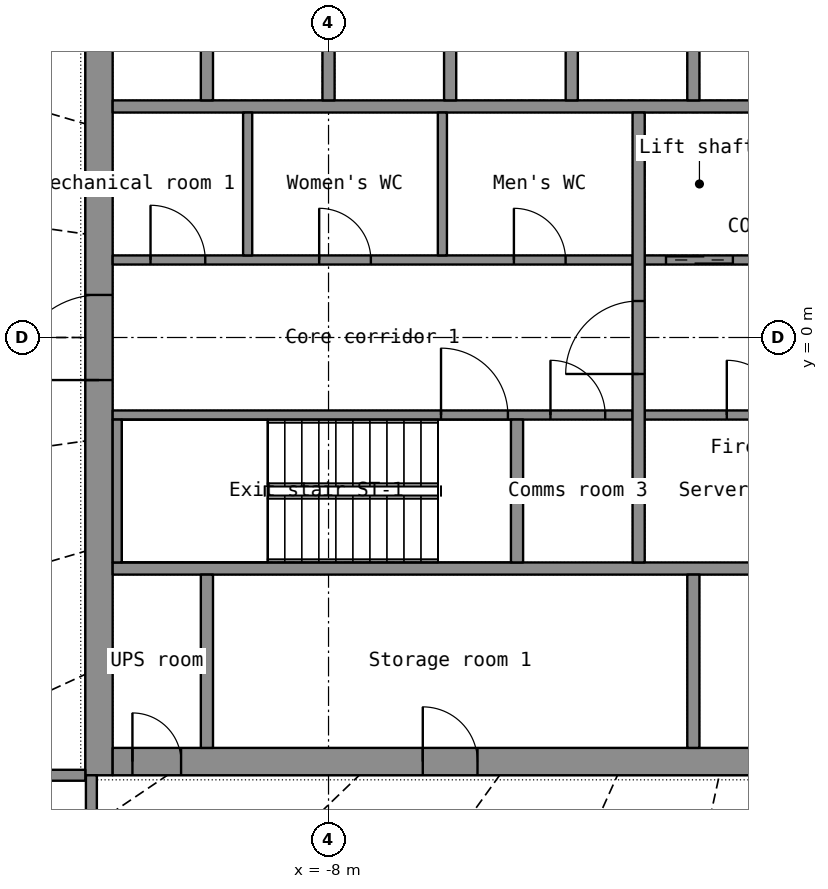
"""IFC4 building model, lengths in metres.
Left out: names, types, materials, properties, quantities, classifications, styles, units other than length and angle.
Written with IfcOpenShell. Run it as: python <this file> out.ifc"""

import sys

from ifc_helpers import new_model, si_unit, direction, frame, frame_2d, origin, place, context, subcontext, project, spatial, rectangle, extrude, element, fill, save


model = new_model("IFC4")
c1 = context("Model", 3, precision=1e-05, world=origin(), true_north=direction((0.0, 1.0)))
c2 = subcontext(c1, "Body", "Model", "MODEL_VIEW")
j1 = project(units=[si_unit("LENGTHUNIT", "METRE"), si_unit("PLANEANGLEUNIT", "RADIAN")], contexts=[c1])
p1 = place(None, origin())
s1 = spatial("IfcSite", under=j1, at=p1, CompositionType="ELEMENT")
p2 = place(p1, origin())
s2 = spatial("IfcBuilding", under=s1, at=p2, CompositionType="ELEMENT")
p3 = place(p2, frame((0.0, 0.0, 205.2)))
s3 = spatial("IfcBuildingStorey", under=s2, at=p3, CompositionType="ELEMENT", Elevation=205.2)
p4 = place(p3, frame((-11.775, -7.2, 0.0), z_axis=(0.0, 0.0, 1.0), x_axis=(0.0, 1.0, 0.0)))
e1 = element("IfcWall", 1, at=p4, inside=s3, PredefinedType="SHEAR", context=c2, shape_type="SweptSolid", body=[
    extrude(rectangle(XDim=14.4, YDim=0.45, at=frame_2d((7.2, 0.0))), origin(), (0.0, 0.0, 1.0), 7.0),
])
p5 = place(p4, frame((6.5, 0.0, 0.0)))
e2 = element("IfcOpeningElement", 2, at=p5, cuts=e1, PredefinedType="OPENING", context=c2, shape_type="SweptSolid", body=[
    extrude(rectangle(XDim=1.4, YDim=2.2, at=frame_2d((0.7, 1.1))), frame((0.0, 0.235, 0.0), z_axis=(0.0, -1.0, 0.0), x_axis=(1.0, 0.0, 0.0)), (0.0, 0.0, 1.0), 0.47),
])
p6 = place(p3, frame((-11.55, -6.975, 0.0), z_axis=(0.0, 0.0, 1.0), x_axis=(1.0, 0.0, 0.0)))
e3 = element("IfcWall", 3, at=p6, inside=s3, PredefinedType="SHEAR", context=c2, shape_type="SweptSolid", body=[
    extrude(rectangle(XDim=23.1, YDim=0.45, at=frame_2d((11.55, 0.0))), origin(), (0.0, 0.0, 1.0), 7.0),
])
p7 = place(p6, frame((20.0, 0.0, 0.0)))
e4 = element("IfcOpeningElement", 4, at=p7, cuts=e3, PredefinedType="OPENING", context=c2, shape_type="SweptSolid", body=[
    extrude(rectangle(XDim=1.1, YDim=2.2, at=frame_2d((0.55, 1.1))), frame((0.0, 0.235, 0.0), z_axis=(0.0, -1.0, 0.0), x_axis=(1.0, 0.0, 0.0)), (0.0, 0.0, 1.0), 0.47),
])
p8 = place(p6, frame((5.1, 0.0, 0.0)))
e5 = element("IfcOpeningElement", 5, at=p8, cuts=e3, PredefinedType="OPENING", context=c2, shape_type="SweptSolid", body=[
    extrude(rectangle(XDim=0.9, YDim=2.1, at=frame_2d((0.45, 1.05))), frame((0.0, 0.235, 0.0), z_axis=(0.0, -1.0, 0.0), x_axis=(1.0, 0.0, 0.0)), (0.0, 0.0, 1.0), 0.47),
])
p9 = place(p6, frame((12.1, 0.0, 0.0)))
e6 = element("IfcOpeningElement", 6, at=p9, cuts=e3, PredefinedType="OPENING", context=c2, shape_type="SweptSolid", body=[
    extrude(rectangle(XDim=0.9, YDim=2.1, at=frame_2d((0.45, 1.05))), frame((0.0, 0.235, 0.0), z_axis=(0.0, -1.0, 0.0), x_axis=(1.0, 0.0, 0.0)), (0.0, 0.0, 1.0), 0.47),
])
p10 = place(p6, frame((17.1, 0.0, 0.0)))
e7 = element("IfcOpeningElement", 7, at=p10, cuts=e3, PredefinedType="OPENING", context=c2, shape_type="SweptSolid", body=[
    extrude(rectangle(XDim=0.9, YDim=2.1, at=frame_2d((0.45, 1.05))), frame((0.0, 0.235, 0.0), z_axis=(0.0, -1.0, 0.0), x_axis=(1.0, 0.0, 0.0)), (0.0, 0.0, 1.0), 0.47),
])
p11 = place(p6, frame((0.325, 0.0, 0.0)))
e8 = element("IfcOpeningElement", 8, at=p11, cuts=e3, PredefinedType="OPENING", context=c2, shape_type="SweptSolid", body=[
    extrude(rectangle(XDim=0.8, YDim=2.05, at=frame_2d((0.4, 1.025))), frame((0.0, 0.235, 0.0), z_axis=(0.0, -1.0, 0.0), x_axis=(1.0, 0.0, 0.0)), (0.0, 0.0, 1.0), 0.47),
])
p12 = place(p6, frame((21.975, 0.0, 0.0)))
e9 = element("IfcOpeningElement", 9, at=p12, cuts=e3, PredefinedType="OPENING", context=c2, shape_type="SweptSolid", body=[
    extrude(rectangle(XDim=0.8, YDim=2.05, at=frame_2d((0.4, 1.025))), frame((0.0, 0.235, 0.0), z_axis=(0.0, -1.0, 0.0), x_axis=(1.0, 0.0, 0.0)), (0.0, 0.0, 1.0), 0.47),
])
for number, where, z_axis, x_axis in (
    (10, (-11.55, -3.8, 0.0), (0.0, 0.0, 1.0), (1.0, 0.0, 0.0)),
    (11, (-11.55, 3.8, 0.0), (0.0, 0.0, 1.0), (1.0, 0.0, 0.0)),
):
    element("IfcWall", number, at=place(p3, frame(where, z_axis=z_axis, x_axis=x_axis)), inside=s3, PredefinedType="SHEAR", context=c2, shape_type="SweptSolid", body=[
        extrude(rectangle(XDim=23.1, YDim=0.2, at=frame_2d((11.55, 0.0))), origin(), (0.0, 0.0, 1.0), 7.0),
    ])
p13 = place(p3, frame((-10.0, -6.75, 0.0), z_axis=(0.0, 0.0, 1.0), x_axis=(0.0, 1.0, 0.0)))
e12 = element("IfcWall", 12, at=p13, inside=s3, PredefinedType="SHEAR", context=c2, shape_type="SweptSolid", body=[
    extrude(rectangle(XDim=2.85, YDim=0.2, at=frame_2d((1.425, 0.0))), origin(), (0.0, 0.0, 1.0), 7.0),
])
p14 = place(p3, frame((-2.0, -6.75, 0.0), z_axis=(0.0, 0.0, 1.0), x_axis=(0.0, 1.0, 0.0)))
e13 = element("IfcWall", 13, at=p14, inside=s3, PredefinedType="PARTITIONING", context=c2, shape_type="SweptSolid", body=[
    extrude(rectangle(XDim=2.85, YDim=0.2, at=frame_2d((1.425, 0.0))), origin(), (0.0, 0.0, 1.0), 7.0),
])
for number, where, z_axis, x_axis in (
    (14, (-10.0, 3.9, 0.0), (0.0, 0.0, 1.0), (0.0, 1.0, 0.0)),
    (15, (-8.0, 3.9, 0.0), (0.0, 0.0, 1.0), (0.0, 1.0, 0.0)),
    (16, (-6.0, 3.9, 0.0), (0.0, 0.0, 1.0), (0.0, 1.0, 0.0)),
    (17, (-4.0, 3.9, 0.0), (0.0, 0.0, 1.0), (0.0, 1.0, 0.0)),
    (18, (-2.0, 3.9, 0.0), (0.0, 0.0, 1.0), (0.0, 1.0, 0.0)),
):
    element("IfcWall", number, at=place(p3, frame(where, z_axis=z_axis, x_axis=x_axis)), inside=s3, PredefinedType="SHEAR", context=c2, shape_type="SweptSolid", body=[
        extrude(rectangle(XDim=2.85, YDim=0.2, at=frame_2d((1.425, 0.0))), origin(), (0.0, 0.0, 1.0), 7.0),
    ])
p15 = place(p3, frame((-11.55, -1.275, 0.0), z_axis=(0.0, 0.0, 1.0), x_axis=(1.0, 0.0, 0.0)))
e19 = element("IfcWall", 19, at=p15, inside=s3, PredefinedType="SHEAR", context=c2, shape_type="SweptSolid", body=[
    extrude(rectangle(XDim=8.55, YDim=0.15, at=frame_2d((4.275, 0.0))), origin(), (0.0, 0.0, 1.0), 7.0),
])
p16 = place(p15, frame((5.4, 0.0, 0.0)))
e20 = element("IfcOpeningElement", 20, at=p16, cuts=e19, PredefinedType="OPENING", context=c2, shape_type="SweptSolid", body=[
    extrude(rectangle(XDim=1.1, YDim=2.15, at=frame_2d((0.55, 1.075))), frame((0.0, 0.085, 0.0), z_axis=(0.0, -1.0, 0.0), x_axis=(1.0, 0.0, 0.0)), (0.0, 0.0, 1.0), 0.17),
])
p17 = place(p15, frame((7.2, 0.0, 0.0)))
e21 = element("IfcOpeningElement", 21, at=p17, cuts=e19, PredefinedType="OPENING", context=c2, shape_type="SweptSolid", body=[
    extrude(rectangle(XDim=0.9, YDim=2.1, at=frame_2d((0.45, 1.05))), frame((0.0, 0.085, 0.0), z_axis=(0.0, -1.0, 0.0), x_axis=(1.0, 0.0, 0.0)), (0.0, 0.0, 1.0), 0.17),
])
p18 = place(p3, frame((-2.8, -1.275, 0.0), z_axis=(0.0, 0.0, 1.0), x_axis=(1.0, 0.0, 0.0)))
e22 = element("IfcWall", 22, at=p18, inside=s3, PredefinedType="SHEAR", context=c2, shape_type="SweptSolid", body=[
    extrude(rectangle(XDim=5.6, YDim=0.15, at=frame_2d((2.8, 0.0))), origin(), (0.0, 0.0, 1.0), 7.0),
])
p19 = place(p18, frame((4.15, 0.0, 0.0)))
e23 = element("IfcOpeningElement", 23, at=p19, cuts=e22, PredefinedType="OPENING", context=c2, shape_type="SweptSolid", body=[
    extrude(rectangle(XDim=1.1, YDim=2.2, at=frame_2d((0.55, 1.1))), frame((0.0, 0.085, 0.0), z_axis=(0.0, -1.0, 0.0), x_axis=(1.0, 0.0, 0.0)), (0.0, 0.0, 1.0), 0.17),
])
p20 = place(p18, frame((1.35, 0.0, 0.0)))
e24 = element("IfcOpeningElement", 24, at=p20, cuts=e22, PredefinedType="OPENING", context=c2, shape_type="SweptSolid", body=[
    extrude(rectangle(XDim=0.9, YDim=2.1, at=frame_2d((0.45, 1.05))), frame((0.0, 0.085, 0.0), z_axis=(0.0, -1.0, 0.0), x_axis=(1.0, 0.0, 0.0)), (0.0, 0.0, 1.0), 0.17),
])
p21 = place(p3, frame((-11.55, 1.275, 0.0), z_axis=(0.0, 0.0, 1.0), x_axis=(1.0, 0.0, 0.0)))
e25 = element("IfcWall", 25, at=p21, inside=s3, PredefinedType="PARTITIONING", context=c2, shape_type="SweptSolid", body=[
    extrude(rectangle(XDim=8.55, YDim=0.15, at=frame_2d((4.275, 0.0))), origin(), (0.0, 0.0, 1.0), 7.0),
])
p22 = place(p21, frame((0.623, 0.0, 0.0)))
e26 = element("IfcOpeningElement", 26, at=p22, cuts=e25, PredefinedType="OPENING", context=c2, shape_type="SweptSolid", body=[
    extrude(rectangle(XDim=0.9, YDim=2.1, at=frame_2d((0.45, 1.05))), frame((0.0, 0.085, 0.0), z_axis=(0.0, -1.0, 0.0), x_axis=(1.0, 0.0, 0.0)), (0.0, 0.0, 1.0), 0.17),
])
p23 = place(p21, frame((3.396, 0.0, 0.0)))
e27 = element("IfcOpeningElement", 27, at=p23, cuts=e25, PredefinedType="OPENING", context=c2, shape_type="SweptSolid", body=[
    extrude(rectangle(XDim=0.85, YDim=2.1, at=frame_2d((0.425, 1.05))), frame((0.0, 0.085, 0.0), z_axis=(0.0, -1.0, 0.0), x_axis=(1.0, 0.0, 0.0)), (0.0, 0.0, 1.0), 0.17),
])
p24 = place(p21, frame((6.599, 0.0, 0.0)))
e28 = element("IfcOpeningElement", 28, at=p24, cuts=e25, PredefinedType="OPENING", context=c2, shape_type="SweptSolid", body=[
    extrude(rectangle(XDim=0.85, YDim=2.1, at=frame_2d((0.425, 1.05))), frame((0.0, 0.085, 0.0), z_axis=(0.0, -1.0, 0.0), x_axis=(1.0, 0.0, 0.0)), (0.0, 0.0, 1.0), 0.17),
])
p25 = place(p3, frame((-2.8, 1.275, 0.0), z_axis=(0.0, 0.0, 1.0), x_axis=(1.0, 0.0, 0.0)))
e29 = element("IfcWall", 29, at=p25, inside=s3, PredefinedType="SHEAR", context=c2, shape_type="SweptSolid", body=[
    extrude(rectangle(XDim=5.6, YDim=0.15, at=frame_2d((2.8, 0.0))), origin(), (0.0, 0.0, 1.0), 7.0),
])
p26 = place(p25, frame((0.35, 0.0, 0.0)))
e30 = element("IfcOpeningElement", 30, at=p26, cuts=e29, PredefinedType="OPENING", context=c2, shape_type="SweptSolid", body=[
    extrude(rectangle(XDim=1.1, YDim=2.2, at=frame_2d((0.55, 1.1))), frame((0.0, 0.085, 0.0), z_axis=(0.0, -1.0, 0.0), x_axis=(1.0, 0.0, 0.0)), (0.0, 0.0, 1.0), 0.17),
])
p27 = place(p25, frame((3.35, 0.0, 0.0)))
e31 = element("IfcOpeningElement", 31, at=p27, cuts=e29, PredefinedType="OPENING", context=c2, shape_type="SweptSolid", body=[
    extrude(rectangle(XDim=0.9, YDim=2.1, at=frame_2d((0.45, 1.05))), frame((0.0, 0.085, 0.0), z_axis=(0.0, -1.0, 0.0), x_axis=(1.0, 0.0, 0.0)), (0.0, 0.0, 1.0), 0.17),
])
p28 = place(p3, frame((-2.9, -3.7, 0.0), z_axis=(0.0, 0.0, 1.0), x_axis=(0.0, 1.0, 0.0)))
e32 = element("IfcWall", 32, at=p28, inside=s3, PredefinedType="SHEAR", context=c2, shape_type="SweptSolid", body=[
    extrude(rectangle(XDim=7.4, YDim=0.2, at=frame_2d((3.7, 0.0))), origin(), (0.0, 0.0, 1.0), 7.0),
])
p29 = place(p28, frame((3.1, 0.0, 0.0)))
e33 = element("IfcOpeningElement", 33, at=p29, cuts=e32, PredefinedType="OPENING", context=c2, shape_type="SweptSolid", body=[
    extrude(rectangle(XDim=1.2, YDim=2.2, at=frame_2d((0.6, 1.1))), frame((0.0, 0.11, 0.0), z_axis=(0.0, -1.0, 0.0), x_axis=(1.0, 0.0, 0.0)), (0.0, 0.0, 1.0), 0.22),
])
p30 = place(p3, frame((-11.475, -3.7, 0.0), z_axis=(0.0, 0.0, 1.0), x_axis=(0.0, 1.0, 0.0)))
e34 = element("IfcWall", 34, at=p30, inside=s3, PredefinedType="SHEAR", context=c2, shape_type="SweptSolid", body=[
    extrude(rectangle(XDim=2.35, YDim=0.15, at=frame_2d((1.175, 0.0))), origin(), (0.0, 0.0, 1.0), 7.0),
])
p31 = place(p3, frame((-4.9, -3.7, 0.0), z_axis=(0.0, 0.0, 1.0), x_axis=(0.0, 1.0, 0.0)))
e35 = element("IfcWall", 35, at=p31, inside=s3, PredefinedType="SHEAR", context=c2, shape_type="SweptSolid", body=[
    extrude(rectangle(XDim=2.35, YDim=0.2, at=frame_2d((1.175, 0.0))), origin(), (0.0, 0.0, 1.0), 7.0),
])
for number, where, z_axis, x_axis in (
    (36, (-9.33, 1.35, 0.0), (0.0, 0.0, 1.0), (0.0, 1.0, 0.0)),
    (37, (-6.127, 1.35, 0.0), (0.0, 0.0, 1.0), (0.0, 1.0, 0.0)),
):
    element("IfcWall", number, at=place(p3, frame(where, z_axis=z_axis, x_axis=x_axis)), inside=s3, PredefinedType="PARTITIONING", context=c2, shape_type="SweptSolid", body=[
        extrude(rectangle(XDim=2.35, YDim=0.15, at=frame_2d((1.175, 0.0))), origin(), (0.0, 0.0, 1.0), 7.0),
    ])
p32 = place(p3, frame((-11.9, -12.1, 0.0), z_axis=(0.0, 0.0, 1.0), x_axis=(0.0, 1.0, 0.0)))
e38 = element("IfcWall", 38, at=p32, inside=s3, PredefinedType="PARTITIONING", context=c2, shape_type="SweptSolid", body=[
    extrude(rectangle(XDim=4.9, YDim=0.18, at=frame_2d((2.45, 0.0))), origin(), (0.0, 0.0, 1.0), 6.1),
])
p33 = place(p32, frame((1.95, 0.0, 0.0)))
e39 = element("IfcOpeningElement", 39, at=p33, cuts=e38, PredefinedType="OPENING", context=c2, shape_type="SweptSolid", body=[
    extrude(rectangle(XDim=1.0, YDim=2.1, at=frame_2d((0.5, 1.05))), frame((0.0, 0.1, 0.0), z_axis=(0.0, -1.0, 0.0), x_axis=(1.0, 0.0, 0.0)), (0.0, 0.0, 1.0), 0.2),
])
p34 = place(p3, frame((-12.0, -7.2, 0.0), z_axis=(0.0, 0.0, 1.0), x_axis=(-1.0, 0.0, 0.0)))
e40 = element("IfcWall", 40, at=p34, inside=s3, PredefinedType="PARTITIONING", context=c2, shape_type="SweptSolid", body=[
    extrude(rectangle(XDim=4.9, YDim=0.18, at=frame_2d((2.45, 0.0))), origin(), (0.0, 0.0, 1.0), 6.1),
])
p35 = place(p8, origin())
e41 = element("IfcDoor", 41, at=p35, inside=s3, OperationType="SINGLE_SWING_LEFT", PredefinedType="DOOR", context=c2, shape_type="SweptSolid", body=[
    extrude(rectangle(XDim=0.9, YDim=2.1, at=frame_2d((0.45, 1.05))), frame((0.0, 0.025, 0.0), z_axis=(0.0, -1.0, 0.0), x_axis=(1.0, 0.0, 0.0)), (0.0, 0.0, 1.0), 0.05),
])
fill(e5, e41)
p36 = place(p11, origin())
e42 = element("IfcDoor", 42, at=p36, inside=s3, OperationType="SINGLE_SWING_LEFT", PredefinedType="DOOR", context=c2, shape_type="SweptSolid", body=[
    extrude(rectangle(XDim=0.8, YDim=2.05, at=frame_2d((0.4, 1.025))), frame((0.0, 0.025, 0.0), z_axis=(0.0, -1.0, 0.0), x_axis=(1.0, 0.0, 0.0)), (0.0, 0.0, 1.0), 0.05),
])
fill(e8, e42)
p37 = place(p5, origin())
e43 = element("IfcDoor", 43, at=p37, inside=s3, OperationType="DOUBLE_DOOR_SINGLE_SWING", PredefinedType="DOOR", context=c2, shape_type="SweptSolid", body=[
    extrude(rectangle(XDim=1.4, YDim=2.2, at=frame_2d((0.7, 1.1))), frame((0.0, 0.025, 0.0), z_axis=(0.0, -1.0, 0.0), x_axis=(1.0, 0.0, 0.0)), (0.0, 0.0, 1.0), 0.05),
])
fill(e2, e43)
p38 = place(p29, origin())
e44 = element("IfcDoor", 44, at=p38, inside=s3, OperationType="SINGLE_SWING_LEFT", PredefinedType="DOOR", context=c2, shape_type="SweptSolid", body=[
    extrude(rectangle(XDim=1.2, YDim=2.2, at=frame_2d((0.6, 1.1))), frame((0.0, 0.025, 0.0), z_axis=(0.0, -1.0, 0.0), x_axis=(1.0, 0.0, 0.0)), (0.0, 0.0, 1.0), 0.05),
])
fill(e33, e44)
p39 = place(p26, origin())
e45 = element("IfcDoor", 45, at=p39, inside=s3, OperationType="DOUBLE_DOOR_SLIDING", PredefinedType="DOOR", context=c2, shape_type="SweptSolid", body=[
    extrude(rectangle(XDim=1.1, YDim=2.2, at=frame_2d((0.55, 1.1))), frame((0.0, 0.025, 0.0), z_axis=(0.0, -1.0, 0.0), x_axis=(1.0, 0.0, 0.0)), (0.0, 0.0, 1.0), 0.05),
])
fill(e30, e45)
p40 = place(p16, origin())
e46 = element("IfcDoor", 46, at=p40, inside=s3, OperationType="SINGLE_SWING_LEFT", PredefinedType="DOOR", context=c2, shape_type="SweptSolid", body=[
    extrude(rectangle(XDim=1.1, YDim=2.15, at=frame_2d((0.55, 1.075))), frame((0.0, 0.025, 0.0), z_axis=(0.0, -1.0, 0.0), x_axis=(1.0, 0.0, 0.0)), (0.0, 0.0, 1.0), 0.05),
])
fill(e20, e46)
p41 = place(p22, origin())
e47 = element("IfcDoor", 47, at=p41, inside=s3, OperationType="SINGLE_SWING_LEFT", PredefinedType="DOOR", context=c2, shape_type="SweptSolid", body=[
    extrude(rectangle(XDim=0.9, YDim=2.1, at=frame_2d((0.45, 1.05))), frame((0.0, 0.025, 0.0), z_axis=(0.0, -1.0, 0.0), x_axis=(1.0, 0.0, 0.0)), (0.0, 0.0, 1.0), 0.05),
])
fill(e26, e47)
p42 = place(p23, origin())
e48 = element("IfcDoor", 48, at=p42, inside=s3, OperationType="SINGLE_SWING_LEFT", PredefinedType="DOOR", context=c2, shape_type="SweptSolid", body=[
    extrude(rectangle(XDim=0.85, YDim=2.1, at=frame_2d((0.425, 1.05))), frame((0.0, 0.025, 0.0), z_axis=(0.0, -1.0, 0.0), x_axis=(1.0, 0.0, 0.0)), (0.0, 0.0, 1.0), 0.05),
])
fill(e27, e48)
p43 = place(p24, origin())
e49 = element("IfcDoor", 49, at=p43, inside=s3, OperationType="SINGLE_SWING_LEFT", PredefinedType="DOOR", context=c2, shape_type="SweptSolid", body=[
    extrude(rectangle(XDim=0.85, YDim=2.1, at=frame_2d((0.425, 1.05))), frame((0.0, 0.025, 0.0), z_axis=(0.0, -1.0, 0.0), x_axis=(1.0, 0.0, 0.0)), (0.0, 0.0, 1.0), 0.05),
])
fill(e28, e49)
p44 = place(p20, origin())
e50 = element("IfcDoor", 50, at=p44, inside=s3, OperationType="SINGLE_SWING_LEFT", PredefinedType="DOOR", context=c2, shape_type="SweptSolid", body=[
    extrude(rectangle(XDim=0.9, YDim=2.1, at=frame_2d((0.45, 1.05))), frame((0.0, 0.025, 0.0), z_axis=(0.0, -1.0, 0.0), x_axis=(1.0, 0.0, 0.0)), (0.0, 0.0, 1.0), 0.05),
])
fill(e24, e50)
p45 = place(p17, origin())
e51 = element("IfcDoor", 51, at=p45, inside=s3, OperationType="SINGLE_SWING_LEFT", PredefinedType="DOOR", context=c2, shape_type="SweptSolid", body=[
    extrude(rectangle(XDim=0.9, YDim=2.1, at=frame_2d((0.45, 1.05))), frame((0.0, 0.025, 0.0), z_axis=(0.0, -1.0, 0.0), x_axis=(1.0, 0.0, 0.0)), (0.0, 0.0, 1.0), 0.05),
])
fill(e21, e51)
save(model, sys.argv[1])
